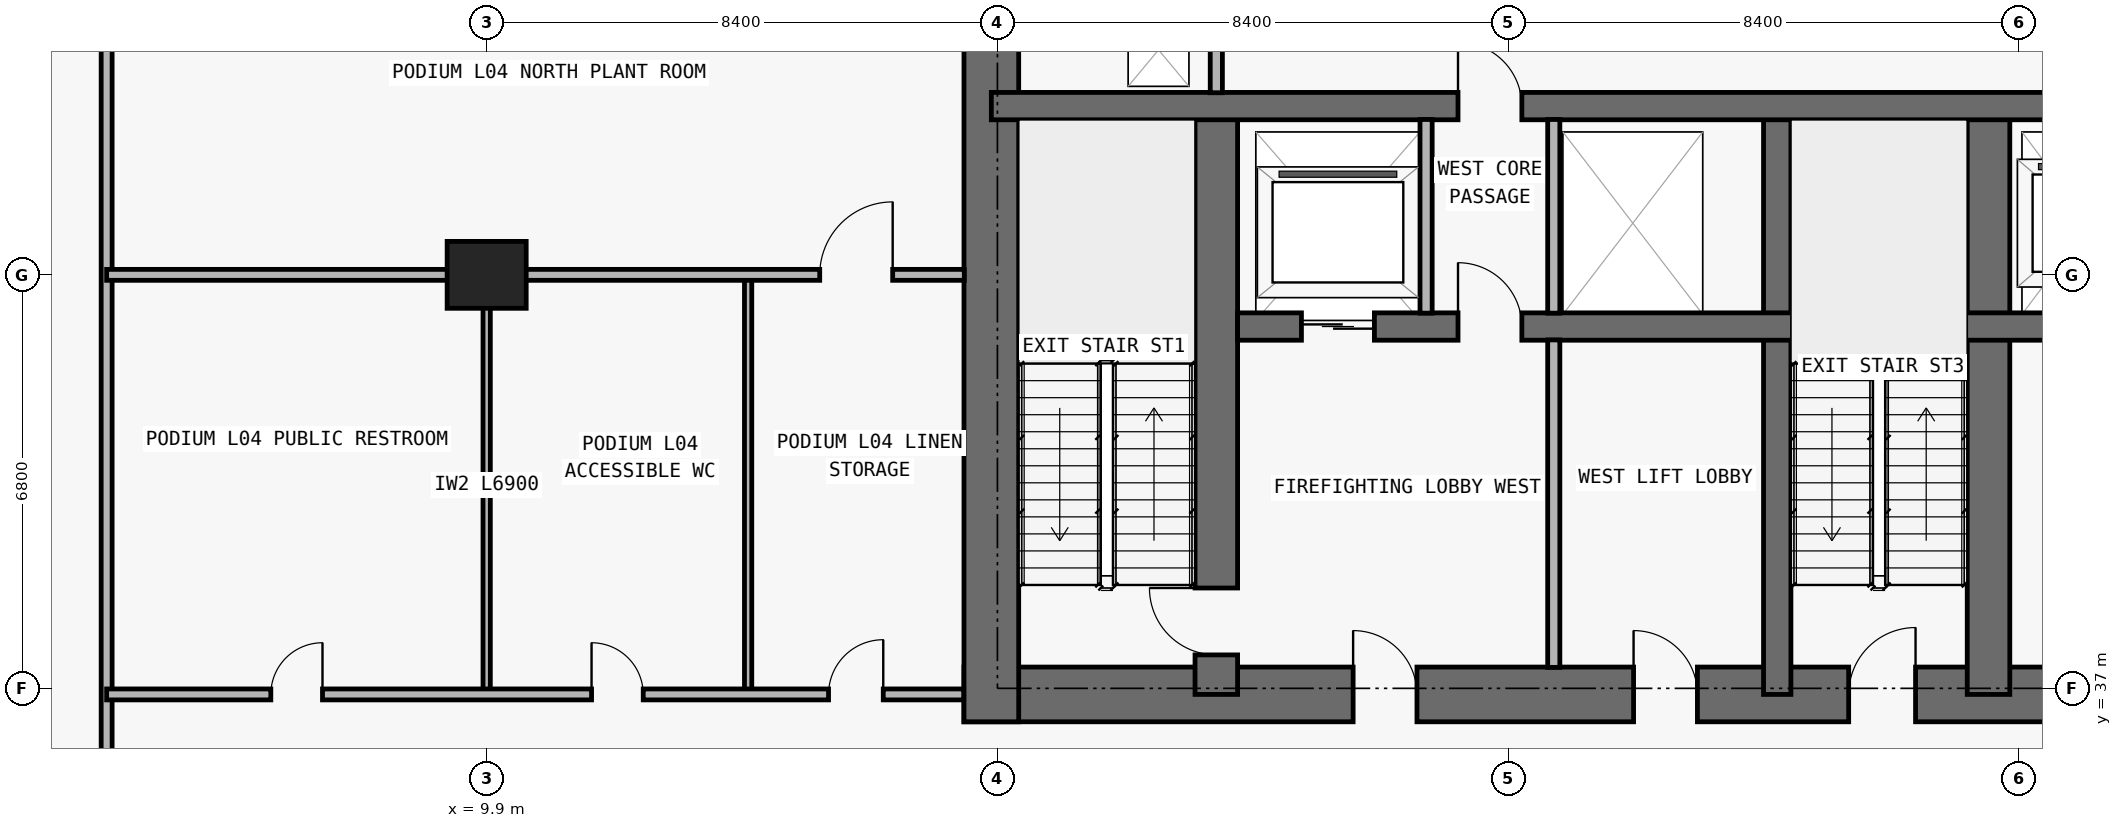
"""IFC4 building model, lengths in metres.
Left out: names, types, materials, properties, quantities, classifications, styles, units other than length and angle.
Written with IfcOpenShell. Run it as: python <this file> out.ifc"""

import sys

from ifc_helpers import new_model, si_unit, direction, frame, frame_2d, origin, origin_2d, place, context, subcontext, project, spatial, rectangle, extrude, element, fill, save


model = new_model("IFC4")
c1 = context("Model", 3, precision=1e-05, world=origin(), true_north=direction((0.0, 1.0)))
c2 = subcontext(c1, "Body", "Model", "MODEL_VIEW")
j1 = project(units=[si_unit("LENGTHUNIT", "METRE"), si_unit("PLANEANGLEUNIT", "RADIAN")], contexts=[c1])
p1 = place(None, origin())
s1 = spatial("IfcSite", under=j1, at=p1, CompositionType="ELEMENT")
p2 = place(p1, origin())
s2 = spatial("IfcBuilding", under=s1, at=p2, CompositionType="ELEMENT")
p3 = place(p2, frame((0.0, 0.0, 19.8)))
s3 = spatial("IfcBuildingStorey", under=s2, at=p3, CompositionType="ELEMENT", Elevation=19.8)
p4 = place(p3, frame((9.9, 43.8, 0.0), z_axis=(0.0, 0.0, 1.0), x_axis=(1.0, 0.0, 0.0)))
e1 = element("IfcColumn", 1, at=p4, inside=s3, PredefinedType="COLUMN", context=c2, shape_type="SweptSolid", body=[
    extrude(rectangle(XDim=1.3, YDim=1.1, at=origin_2d()), origin(), (0.0, 0.0, 1.0), 4.45),
])
p5 = place(p3, frame((17.75, 36.9, 0.0), z_axis=(0.0, 0.0, 1.0), x_axis=(1.0, 0.0, 0.0)))
e2 = element("IfcWall", 2, at=p5, inside=s3, PredefinedType="SHEAR", context=c2, shape_type="SweptSolid", body=[
    extrude(rectangle(XDim=42.3, YDim=0.9, at=frame_2d((21.15, 0.0))), origin(), (0.0, 0.0, 1.0), 4.45),
])
p6 = place(p5, frame((14.55, 0.0, 0.0)))
e3 = element("IfcOpeningElement", 3, at=p6, cuts=e2, PredefinedType="OPENING", context=c2, shape_type="SweptSolid", body=[
    extrude(rectangle(XDim=1.1, YDim=2.15, at=frame_2d((0.55, 1.075))), frame((0.0, 0.46, 0.0), z_axis=(0.0, -1.0, 0.0), x_axis=(1.0, 0.0, 0.0)), (0.0, 0.0, 1.0), 0.92),
])
p7 = place(p5, frame((6.4, 0.0, 0.0)))
e4 = element("IfcOpeningElement", 4, at=p7, cuts=e2, PredefinedType="OPENING", context=c2, shape_type="SweptSolid", body=[
    extrude(rectangle(XDim=1.05, YDim=2.15, at=frame_2d((0.525, 1.075))), frame((0.0, 0.46, 0.0), z_axis=(0.0, -1.0, 0.0), x_axis=(1.0, 0.0, 0.0)), (0.0, 0.0, 1.0), 0.92),
])
p8 = place(p5, frame((34.9, 0.0, 0.0)))
e5 = element("IfcOpeningElement", 5, at=p8, cuts=e2, PredefinedType="OPENING", context=c2, shape_type="SweptSolid", body=[
    extrude(rectangle(XDim=1.05, YDim=2.15, at=frame_2d((0.525, 1.075))), frame((0.0, 0.46, 0.0), z_axis=(0.0, -1.0, 0.0), x_axis=(1.0, 0.0, 0.0)), (0.0, 0.0, 1.0), 0.92),
])
p9 = place(p5, frame((11.012, 0.0, 0.0)))
e6 = element("IfcOpeningElement", 6, at=p9, cuts=e2, PredefinedType="OPENING", context=c2, shape_type="SweptSolid", body=[
    extrude(rectangle(XDim=1.05, YDim=2.15, at=frame_2d((0.525, 1.075))), frame((0.0, 0.46, 0.0), z_axis=(0.0, -1.0, 0.0), x_axis=(1.0, 0.0, 0.0)), (0.0, 0.0, 1.0), 0.92),
])
p10 = place(p5, frame((24.25, 0.0, 0.0)))
e7 = element("IfcOpeningElement", 7, at=p10, cuts=e2, PredefinedType="OPENING", context=c2, shape_type="SweptSolid", body=[
    extrude(rectangle(XDim=1.05, YDim=2.15, at=frame_2d((0.525, 1.075))), frame((0.0, 0.46, 0.0), z_axis=(0.0, -1.0, 0.0), x_axis=(1.0, 0.0, 0.0)), (0.0, 0.0, 1.0), 0.92),
])
p11 = place(p3, frame((18.2, 36.45, 0.0), z_axis=(0.0, 0.0, 1.0), x_axis=(0.0, 1.0, 0.0)))
e8 = element("IfcWall", 8, at=p11, inside=s3, PredefinedType="SHEAR", context=c2, shape_type="SweptSolid", body=[
    extrude(rectangle(XDim=14.15, YDim=0.9, at=frame_2d((7.075, 0.0))), origin(), (0.0, 0.0, 1.0), 4.45),
])
p12 = place(p3, frame((21.9, 36.9, 0.0), z_axis=(0.0, 0.0, 1.0), x_axis=(0.0, 1.0, 0.0)))
e9 = element("IfcWall", 9, at=p12, inside=s3, PredefinedType="SHEAR", context=c2, shape_type="SweptSolid", body=[
    extrude(rectangle(XDim=9.675, YDim=0.7, at=frame_2d((4.837, 0.0))), origin(), (0.0, 0.0, 1.0), 4.45),
])
p13 = place(p12, frame((0.65, 0.0, 0.0)))
e10 = element("IfcOpeningElement", 10, at=p13, cuts=e9, PredefinedType="OPENING", context=c2, shape_type="SweptSolid", body=[
    extrude(rectangle(XDim=1.1, YDim=2.15, at=frame_2d((0.55, 1.075))), frame((0.0, 0.36, 0.0), z_axis=(0.0, -1.0, 0.0), x_axis=(1.0, 0.0, 0.0)), (0.0, 0.0, 1.0), 0.72),
])
p14 = place(p3, frame((31.125, 36.9, 0.0), z_axis=(0.0, 0.0, 1.0), x_axis=(0.0, 1.0, 0.0)))
e11 = element("IfcWall", 11, at=p14, inside=s3, PredefinedType="SHEAR", context=c2, shape_type="SweptSolid", body=[
    extrude(rectangle(XDim=9.675, YDim=0.45, at=frame_2d((4.837, 0.0))), origin(), (0.0, 0.0, 1.0), 4.45),
])
p15 = place(p3, frame((34.6, 36.9, 0.0), z_axis=(0.0, 0.0, 1.0), x_axis=(0.0, 1.0, 0.0)))
e12 = element("IfcWall", 12, at=p15, inside=s3, PredefinedType="SHEAR", context=c2, shape_type="SweptSolid", body=[
    extrude(rectangle(XDim=9.675, YDim=0.7, at=frame_2d((4.837, 0.0))), origin(), (0.0, 0.0, 1.0), 4.45),
])
p16 = place(p3, frame((22.25, 42.95, 0.0), z_axis=(0.0, 0.0, 1.0), x_axis=(1.0, 0.0, 0.0)))
e13 = element("IfcWall", 13, at=p16, inside=s3, PredefinedType="SHEAR", context=c2, shape_type="SweptSolid", body=[
    extrude(rectangle(XDim=33.3, YDim=0.45, at=frame_2d((16.65, 0.0))), origin(), (0.0, 0.0, 1.0), 4.45),
])
p17 = place(p16, frame((1.05, 0.0, 0.0)))
e14 = element("IfcOpeningElement", 14, at=p17, cuts=e13, PredefinedType="OPENING", context=c2, shape_type="SweptSolid", body=[
    extrude(rectangle(XDim=1.2, YDim=2.2, at=frame_2d((0.6, 1.1))), frame((0.0, 0.235, 0.0), z_axis=(0.0, -1.0, 0.0), x_axis=(1.0, 0.0, 0.0)), (0.0, 0.0, 1.0), 0.47),
])
p18 = place(p16, frame((31.05, 0.0, 0.0)))
e15 = element("IfcOpeningElement", 15, at=p18, cuts=e13, PredefinedType="OPENING", context=c2, shape_type="SweptSolid", body=[
    extrude(rectangle(XDim=1.2, YDim=2.2, at=frame_2d((0.6, 1.1))), frame((0.0, 0.235, 0.0), z_axis=(0.0, -1.0, 0.0), x_axis=(1.0, 0.0, 0.0)), (0.0, 0.0, 1.0), 0.47),
])
p19 = place(p16, frame((13.5, 0.0, 0.0)))
e16 = element("IfcOpeningElement", 16, at=p19, cuts=e13, PredefinedType="OPENING", context=c2, shape_type="SweptSolid", body=[
    extrude(rectangle(XDim=1.1, YDim=2.2, at=frame_2d((0.55, 1.1))), frame((0.0, 0.235, 0.0), z_axis=(0.0, -1.0, 0.0), x_axis=(1.0, 0.0, 0.0)), (0.0, 0.0, 1.0), 0.47),
])
p20 = place(p16, frame((16.1, 0.0, 0.0)))
e17 = element("IfcOpeningElement", 17, at=p20, cuts=e13, PredefinedType="OPENING", context=c2, shape_type="SweptSolid", body=[
    extrude(rectangle(XDim=1.1, YDim=2.2, at=frame_2d((0.55, 1.1))), frame((0.0, 0.235, 0.0), z_axis=(0.0, -1.0, 0.0), x_axis=(1.0, 0.0, 0.0)), (0.0, 0.0, 1.0), 0.47),
])
p21 = place(p16, frame((18.7, 0.0, 0.0)))
e18 = element("IfcOpeningElement", 18, at=p21, cuts=e13, PredefinedType="OPENING", context=c2, shape_type="SweptSolid", body=[
    extrude(rectangle(XDim=1.1, YDim=2.2, at=frame_2d((0.55, 1.1))), frame((0.0, 0.235, 0.0), z_axis=(0.0, -1.0, 0.0), x_axis=(1.0, 0.0, 0.0)), (0.0, 0.0, 1.0), 0.47),
])
p22 = place(p16, frame((3.625, 0.0, 0.0)))
e19 = element("IfcOpeningElement", 19, at=p22, cuts=e13, PredefinedType="OPENING", context=c2, shape_type="SweptSolid", body=[
    extrude(rectangle(XDim=1.05, YDim=2.15, at=frame_2d((0.525, 1.075))), frame((0.0, 0.235, 0.0), z_axis=(0.0, -1.0, 0.0), x_axis=(1.0, 0.0, 0.0)), (0.0, 0.0, 1.0), 0.47),
])
p23 = place(p16, frame((28.675, 0.0, 0.0)))
e20 = element("IfcOpeningElement", 20, at=p23, cuts=e13, PredefinedType="OPENING", context=c2, shape_type="SweptSolid", body=[
    extrude(rectangle(XDim=1.05, YDim=2.15, at=frame_2d((0.525, 1.075))), frame((0.0, 0.235, 0.0), z_axis=(0.0, -1.0, 0.0), x_axis=(1.0, 0.0, 0.0)), (0.0, 0.0, 1.0), 0.47),
])
p24 = place(p3, frame((18.2, 46.575, 0.0), z_axis=(0.0, 0.0, 1.0), x_axis=(1.0, 0.0, 0.0)))
e21 = element("IfcWall", 21, at=p24, inside=s3, PredefinedType="SHEAR", context=c2, shape_type="SweptSolid", body=[
    extrude(rectangle(XDim=41.4, YDim=0.45, at=frame_2d((20.7, 0.0))), origin(), (0.0, 0.0, 1.0), 4.45),
])
p25 = place(p24, frame((7.675, 0.0, 0.0)))
e22 = element("IfcOpeningElement", 22, at=p25, cuts=e21, PredefinedType="OPENING", context=c2, shape_type="SweptSolid", body=[
    extrude(rectangle(XDim=1.05, YDim=2.15, at=frame_2d((0.525, 1.075))), frame((0.0, 0.235, 0.0), z_axis=(0.0, -1.0, 0.0), x_axis=(1.0, 0.0, 0.0)), (0.0, 0.0, 1.0), 0.47),
])
p26 = place(p24, frame((32.725, 0.0, 0.0)))
e23 = element("IfcOpeningElement", 23, at=p26, cuts=e21, PredefinedType="OPENING", context=c2, shape_type="SweptSolid", body=[
    extrude(rectangle(XDim=1.05, YDim=2.15, at=frame_2d((0.525, 1.075))), frame((0.0, 0.235, 0.0), z_axis=(0.0, -1.0, 0.0), x_axis=(1.0, 0.0, 0.0)), (0.0, 0.0, 1.0), 0.47),
])
p27 = place(p3, frame((3.65, 22.84, 0.0), z_axis=(0.0, 0.0, 1.0), x_axis=(0.0, 1.0, 0.0)))
e24 = element("IfcWall", 24, at=p27, inside=s3, PredefinedType="PARTITIONING", context=c2, shape_type="SweptSolid", body=[
    extrude(rectangle(XDim=25.44, YDim=0.18, at=frame_2d((12.72, 0.0))), origin(), (0.0, 0.0, 1.0), 4.45),
])
p28 = place(p3, frame((9.9, 36.9, 0.0), z_axis=(0.0, 0.0, 1.0), x_axis=(0.0, 1.0, 0.0)))
e25 = element("IfcWall", 25, at=p28, inside=s3, PredefinedType="PARTITIONING", context=c2, shape_type="SweptSolid", body=[
    extrude(rectangle(XDim=6.9, YDim=0.12, at=frame_2d((3.45, 0.0))), origin(), (0.0, 0.0, 1.0), 3.414),
])
p29 = place(p3, frame((14.2, 36.9, 0.0), z_axis=(0.0, 0.0, 1.0), x_axis=(0.0, 1.0, 0.0)))
e26 = element("IfcWall", 26, at=p29, inside=s3, PredefinedType="PARTITIONING", context=c2, shape_type="SweptSolid", body=[
    extrude(rectangle(XDim=6.9, YDim=0.12, at=frame_2d((3.45, 0.0))), origin(), (0.0, 0.0, 1.0), 4.45),
])
p30 = place(p3, frame((21.9, 46.795, 0.0), z_axis=(0.0, 0.0, 1.0), x_axis=(0.0, 1.0, 0.0)))
e27 = element("IfcWall", 27, at=p30, inside=s3, PredefinedType="PARTITIONING", context=c2, shape_type="SweptSolid", body=[
    extrude(rectangle(XDim=1.605, YDim=0.2, at=frame_2d((0.802, 0.0))), origin(), (0.0, 0.0, 1.0), 4.45),
])
p31 = place(p3, frame((25.35, 43.17, 0.0), z_axis=(0.0, 0.0, 1.0), x_axis=(0.0, 1.0, 0.0)))
e28 = element("IfcWall", 28, at=p31, inside=s3, PredefinedType="PARTITIONING", context=c2, shape_type="SweptSolid", body=[
    extrude(rectangle(XDim=3.185, YDim=0.2, at=frame_2d((1.593, 0.0))), origin(), (0.0, 0.0, 1.0), 4.45),
])
p32 = place(p3, frame((27.45, 37.345, 0.0), z_axis=(0.0, 0.0, 1.0), x_axis=(0.0, 1.0, 0.0)))
e29 = element("IfcWall", 29, at=p32, inside=s3, PredefinedType="PARTITIONING", context=c2, shape_type="SweptSolid", body=[
    extrude(rectangle(XDim=5.385, YDim=0.2, at=frame_2d((2.692, 0.0))), origin(), (0.0, 0.0, 1.0), 4.45),
])
p33 = place(p3, frame((27.45, 43.17, 0.0), z_axis=(0.0, 0.0, 1.0), x_axis=(0.0, 1.0, 0.0)))
e30 = element("IfcWall", 30, at=p33, inside=s3, PredefinedType="PARTITIONING", context=c2, shape_type="SweptSolid", body=[
    extrude(rectangle(XDim=3.185, YDim=0.2, at=frame_2d((1.593, 0.0))), origin(), (0.0, 0.0, 1.0), 4.45),
])
p34 = place(p3, frame((3.65, 36.9, 0.0), z_axis=(0.0, 0.0, 1.0), x_axis=(1.0, 0.0, 0.0)))
e31 = element("IfcWall", 31, at=p34, inside=s3, PredefinedType="PARTITIONING", context=c2, shape_type="SweptSolid", body=[
    extrude(rectangle(XDim=14.095, YDim=0.18, at=frame_2d((7.048, 0.0))), origin(), (0.0, 0.0, 1.0), 4.45),
])
p35 = place(p34, frame((2.7, 0.0, 0.0)))
e32 = element("IfcOpeningElement", 32, at=p35, cuts=e31, PredefinedType="OPENING", context=c2, shape_type="SweptSolid", body=[
    extrude(rectangle(XDim=0.85, YDim=2.1, at=frame_2d((0.425, 1.05))), frame((0.0, 0.1, 0.0), z_axis=(0.0, -1.0, 0.0), x_axis=(1.0, 0.0, 0.0)), (0.0, 0.0, 1.0), 0.2),
])
p36 = place(p34, frame((7.975, 0.0, 0.0)))
e33 = element("IfcOpeningElement", 33, at=p36, cuts=e31, PredefinedType="OPENING", context=c2, shape_type="SweptSolid", body=[
    extrude(rectangle(XDim=0.85, YDim=2.1, at=frame_2d((0.425, 1.05))), frame((0.0, 0.1, 0.0), z_axis=(0.0, -1.0, 0.0), x_axis=(1.0, 0.0, 0.0)), (0.0, 0.0, 1.0), 0.2),
])
p37 = place(p34, frame((11.873, 0.0, 0.0)))
e34 = element("IfcOpeningElement", 34, at=p37, cuts=e31, PredefinedType="OPENING", context=c2, shape_type="SweptSolid", body=[
    extrude(rectangle(XDim=0.9, YDim=2.15, at=frame_2d((0.45, 1.075))), frame((0.0, 0.1, 0.0), z_axis=(0.0, -1.0, 0.0), x_axis=(1.0, 0.0, 0.0)), (0.0, 0.0, 1.0), 0.2),
])
p38 = place(p3, frame((3.65, 43.8, 0.0), z_axis=(0.0, 0.0, 1.0), x_axis=(1.0, 0.0, 0.0)))
e35 = element("IfcWall", 35, at=p38, inside=s3, PredefinedType="PARTITIONING", context=c2, shape_type="SweptSolid", body=[
    extrude(rectangle(XDim=14.105, YDim=0.18, at=frame_2d((7.052, 0.0))), origin(), (0.0, 0.0, 1.0), 3.739),
])
p39 = place(p38, frame((11.728, 0.0, 0.0)))
e36 = element("IfcOpeningElement", 36, at=p39, cuts=e35, PredefinedType="OPENING", context=c2, shape_type="SweptSolid", body=[
    extrude(rectangle(XDim=1.2, YDim=2.2, at=frame_2d((0.6, 1.1))), frame((0.0, 0.1, 0.0), z_axis=(0.0, -1.0, 0.0), x_axis=(1.0, 0.0, 0.0)), (0.0, 0.0, 1.0), 0.2),
])
p40 = place(p17, origin())
e37 = element("IfcDoor", 37, at=p40, inside=s3, OperationType="DOUBLE_DOOR_SLIDING", PredefinedType="DOOR", context=c2, shape_type="SweptSolid", body=[
    extrude(rectangle(XDim=1.2, YDim=2.2, at=frame_2d((0.6, 1.1))), frame((0.0, 0.025, 0.0), z_axis=(0.0, -1.0, 0.0), x_axis=(1.0, 0.0, 0.0)), (0.0, 0.0, 1.0), 0.05),
])
fill(e14, e37)
p41 = place(p6, origin())
e38 = element("IfcDoor", 38, at=p41, inside=s3, OperationType="SINGLE_SWING_RIGHT", PredefinedType="DOOR", context=c2, shape_type="SweptSolid", body=[
    extrude(rectangle(XDim=1.1, YDim=2.15, at=frame_2d((0.55, 1.075))), frame((0.0, 0.025, 0.0), z_axis=(0.0, -1.0, 0.0), x_axis=(1.0, 0.0, 0.0)), (0.0, 0.0, 1.0), 0.05),
])
fill(e3, e38)
p42 = place(p7, origin())
e39 = element("IfcDoor", 39, at=p42, inside=s3, OperationType="SINGLE_SWING_LEFT", PredefinedType="DOOR", context=c2, shape_type="SweptSolid", body=[
    extrude(rectangle(XDim=1.05, YDim=2.15, at=frame_2d((0.525, 1.075))), frame((0.0, 0.025, 0.0), z_axis=(0.0, -1.0, 0.0), x_axis=(1.0, 0.0, 0.0)), (0.0, 0.0, 1.0), 0.05),
])
fill(e4, e39)
p43 = place(p13, origin())
e40 = element("IfcDoor", 40, at=p43, inside=s3, OperationType="SINGLE_SWING_RIGHT", PredefinedType="DOOR", context=c2, shape_type="SweptSolid", body=[
    extrude(rectangle(XDim=1.1, YDim=2.15, at=frame_2d((0.55, 1.075))), frame((0.0, 0.025, 0.0), z_axis=(0.0, -1.0, 0.0), x_axis=(1.0, 0.0, 0.0)), (0.0, 0.0, 1.0), 0.05),
])
fill(e10, e40)
p44 = place(p22, origin())
e41 = element("IfcDoor", 41, at=p44, inside=s3, OperationType="SINGLE_SWING_LEFT", PredefinedType="DOOR", context=c2, shape_type="SweptSolid", body=[
    extrude(rectangle(XDim=1.05, YDim=2.15, at=frame_2d((0.525, 1.075))), frame((0.0, 0.025, 0.0), z_axis=(0.0, -1.0, 0.0), x_axis=(1.0, 0.0, 0.0)), (0.0, 0.0, 1.0), 0.05),
])
fill(e19, e41)
p45 = place(p9, origin())
e42 = element("IfcDoor", 42, at=p45, inside=s3, OperationType="SINGLE_SWING_LEFT", PredefinedType="DOOR", context=c2, shape_type="SweptSolid", body=[
    extrude(rectangle(XDim=1.05, YDim=2.15, at=frame_2d((0.525, 1.075))), frame((0.0, 0.025, 0.0), z_axis=(0.0, -1.0, 0.0), x_axis=(1.0, 0.0, 0.0)), (0.0, 0.0, 1.0), 0.05),
])
fill(e6, e42)
p46 = place(p25, origin())
e43 = element("IfcDoor", 43, at=p46, inside=s3, OperationType="SINGLE_SWING_LEFT", PredefinedType="DOOR", context=c2, shape_type="SweptSolid", body=[
    extrude(rectangle(XDim=1.05, YDim=2.15, at=frame_2d((0.525, 1.075))), frame((0.0, 0.025, 0.0), z_axis=(0.0, -1.0, 0.0), x_axis=(1.0, 0.0, 0.0)), (0.0, 0.0, 1.0), 0.05),
])
fill(e22, e43)
p47 = place(p35, origin())
e44 = element("IfcDoor", 44, at=p47, inside=s3, OperationType="SINGLE_SWING_RIGHT", PredefinedType="DOOR", context=c2, shape_type="SweptSolid", body=[
    extrude(rectangle(XDim=0.85, YDim=2.1, at=frame_2d((0.425, 1.05))), frame((0.0, 0.025, 0.0), z_axis=(0.0, -1.0, 0.0), x_axis=(1.0, 0.0, 0.0)), (0.0, 0.0, 1.0), 0.05),
])
fill(e32, e44)
p48 = place(p36, origin())
e45 = element("IfcDoor", 45, at=p48, inside=s3, OperationType="SINGLE_SWING_LEFT", PredefinedType="DOOR", context=c2, shape_type="SweptSolid", body=[
    extrude(rectangle(XDim=0.85, YDim=2.1, at=frame_2d((0.425, 1.05))), frame((0.0, 0.025, 0.0), z_axis=(0.0, -1.0, 0.0), x_axis=(1.0, 0.0, 0.0)), (0.0, 0.0, 1.0), 0.05),
])
fill(e33, e45)
p49 = place(p37, origin())
e46 = element("IfcDoor", 46, at=p49, inside=s3, OperationType="SINGLE_SWING_RIGHT", PredefinedType="DOOR", context=c2, shape_type="SweptSolid", body=[
    extrude(rectangle(XDim=0.9, YDim=2.15, at=frame_2d((0.45, 1.075))), frame((0.0, 0.025, 0.0), z_axis=(0.0, -1.0, 0.0), x_axis=(1.0, 0.0, 0.0)), (0.0, 0.0, 1.0), 0.05),
])
fill(e34, e46)
p50 = place(p39, origin())
e47 = element("IfcDoor", 47, at=p50, inside=s3, OperationType="SINGLE_SWING_RIGHT", PredefinedType="DOOR", context=c2, shape_type="SweptSolid", body=[
    extrude(rectangle(XDim=1.2, YDim=2.2, at=frame_2d((0.6, 1.1))), frame((0.0, 0.025, 0.0), z_axis=(0.0, -1.0, 0.0), x_axis=(1.0, 0.0, 0.0)), (0.0, 0.0, 1.0), 0.05),
])
fill(e36, e47)
save(model, sys.argv[1])
